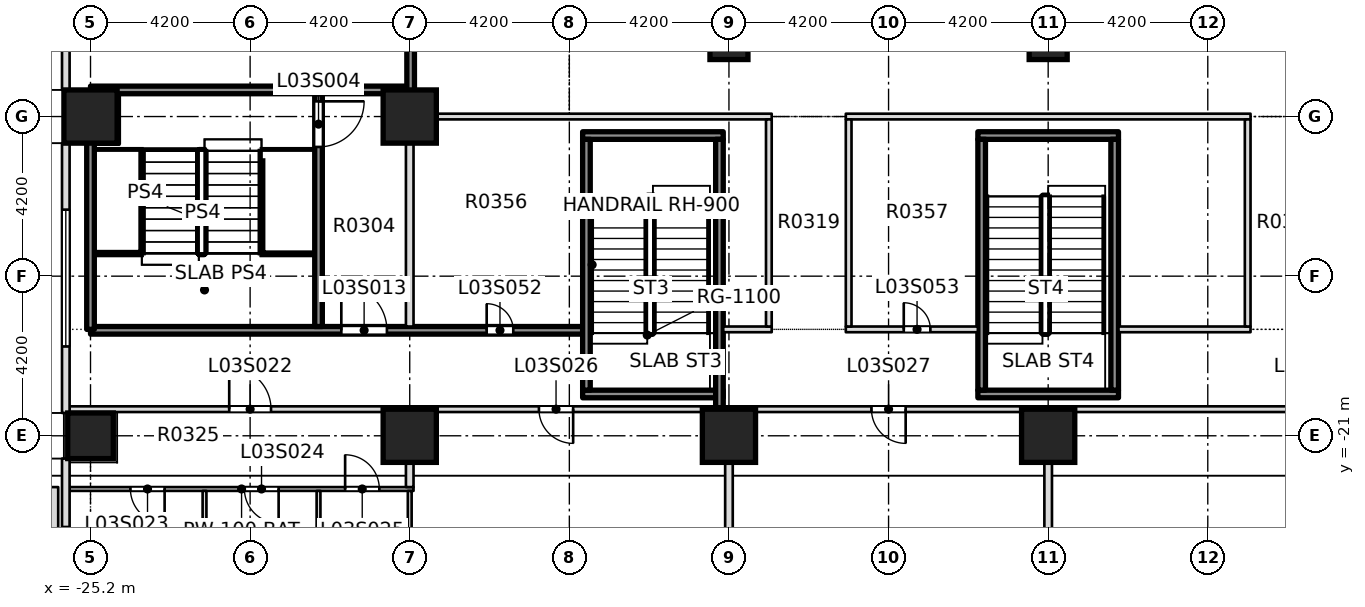
"""IFC4 building model, lengths in metres.
Left out: names, types, materials, properties, quantities, classifications, styles, units other than length and angle.
Written with IfcOpenShell. Run it as: python <this file> out.ifc"""

import sys

from ifc_helpers import new_model, si_unit, direction, frame, frame_2d, origin, origin_2d, place, context, subcontext, project, spatial, rectangle, extrude, element, fill, save


model = new_model("IFC4")
c1 = context("Model", 3, precision=1e-05, world=origin(), true_north=direction((0.0, 1.0)))
c2 = subcontext(c1, "Body", "Model", "MODEL_VIEW")
j1 = project(units=[si_unit("LENGTHUNIT", "METRE"), si_unit("PLANEANGLEUNIT", "RADIAN")], contexts=[c1])
p1 = place(None, origin())
s1 = spatial("IfcSite", under=j1, at=p1, CompositionType="ELEMENT")
p2 = place(p1, origin())
s2 = spatial("IfcBuilding", under=s1, at=p2, CompositionType="ELEMENT")
p3 = place(p2, frame((0.0, 0.0, 20.0)))
s3 = spatial("IfcBuildingStorey", under=s2, at=p3, CompositionType="ELEMENT", Elevation=20.0)
for number, where, z_axis, x_axis in (
    (1, (-16.8, -21.0, -0.4), (0.0, 0.0, 1.0), (1.0, 0.0, 0.0)),
    (2, (-8.4, -21.0, -0.4), (0.0, 0.0, 1.0), (1.0, 0.0, 0.0)),
    (3, (0.0, -21.0, -0.4), (0.0, 0.0, 1.0), (1.0, 0.0, 0.0)),
    (4, (-25.2, -12.6, -0.4), (0.0, 0.0, 1.0), (1.0, 0.0, 0.0)),
    (5, (-16.8, -12.6, -0.4), (0.0, 0.0, 1.0), (1.0, 0.0, 0.0)),
):
    element("IfcColumn", number, at=place(p3, frame(where, z_axis=z_axis, x_axis=x_axis)), inside=s3, PredefinedType="COLUMN", context=c2, shape_type="SweptSolid", body=[
        extrude(rectangle(XDim=1.4, YDim=1.4, at=origin_2d()), origin(), (0.0, 0.0, 1.0), 5.0),
    ])
for number, where, z_axis, x_axis in (
    (6, (-8.4, -10.6, -0.4), (0.0, 0.0, 1.0), (1.0, 0.0, 0.0)),
    (7, (0.0, -10.6, -0.4), (0.0, 0.0, 1.0), (1.0, 0.0, 0.0)),
):
    element("IfcColumn", number, at=place(p3, frame(where, z_axis=z_axis, x_axis=x_axis)), inside=s3, PredefinedType="COLUMN", context=c2, shape_type="SweptSolid", body=[
        extrude(rectangle(XDim=1.0, YDim=1.0, at=origin_2d()), origin(), (0.0, 0.0, 1.0), 5.0),
    ])
p4 = place(p3, frame((-25.2, -21.0, 0.0), z_axis=(0.0, 0.0, 1.0), x_axis=(1.0, 0.0, 0.0)))
e8 = element("IfcColumn", 8, at=p4, inside=s3, PredefinedType="COLUMN", context=c2, shape_type="SweptSolid", body=[
    extrude(rectangle(XDim=1.2, YDim=1.2, at=origin_2d()), origin(), (0.0, 0.0, 1.0), 5.0),
])
p5 = place(p3, frame((-26.15, -30.25, 5.0), z_axis=(0.0, 0.0, 1.0), x_axis=(0.0, 1.0, 0.0)))
e9 = element("IfcWall", 9, at=p5, inside=s3, PredefinedType="PARAPET", context=c2, shape_type="SweptSolid", body=[
    extrude(rectangle(XDim=7.9, YDim=0.2, at=frame_2d((3.95, 0.0))), origin(), (0.0, 0.0, 1.0), 1.2),
])
p6 = place(p3, frame((-25.75, -22.4, 0.0), z_axis=(0.0, 0.0, 1.0), x_axis=(1.0, 0.0, 0.0)))
e10 = element("IfcWall", 10, at=p6, inside=s3, PredefinedType="PARTITIONING", context=c2, shape_type="SweptSolid", body=[
    extrude(rectangle(XDim=9.05, YDim=0.1, at=frame_2d((4.525, 0.0))), origin(), (0.0, 0.0, 1.0), 4.6),
])
p7 = place(p6, frame((1.6, 0.0, 0.0)))
e11 = element("IfcOpeningElement", 11, at=p7, cuts=e10, PredefinedType="OPENING", context=c2, shape_type="SweptSolid", body=[
    extrude(rectangle(XDim=0.9, YDim=2.1, at=frame_2d((0.45, 1.05))), frame((0.0, 0.06, 0.0), z_axis=(0.0, -1.0, 0.0), x_axis=(1.0, 0.0, 0.0)), (0.0, 0.0, 1.0), 0.12),
])
p8 = place(p6, frame((4.6, 0.0, 0.0)))
e12 = element("IfcOpeningElement", 12, at=p8, cuts=e10, PredefinedType="OPENING", context=c2, shape_type="SweptSolid", body=[
    extrude(rectangle(XDim=0.9, YDim=2.1, at=frame_2d((0.45, 1.05))), frame((0.0, 0.06, 0.0), z_axis=(0.0, -1.0, 0.0), x_axis=(1.0, 0.0, 0.0)), (0.0, 0.0, 1.0), 0.12),
])
p9 = place(p6, frame((7.25, 0.0, 0.0)))
e13 = element("IfcOpeningElement", 13, at=p9, cuts=e10, PredefinedType="OPENING", context=c2, shape_type="SweptSolid", body=[
    extrude(rectangle(XDim=0.9, YDim=2.1, at=frame_2d((0.45, 1.05))), frame((0.0, 0.06, 0.0), z_axis=(0.0, -1.0, 0.0), x_axis=(1.0, 0.0, 0.0)), (0.0, 0.0, 1.0), 0.12),
])
p10 = place(p3, frame((-25.75, -20.3, 0.0), z_axis=(0.0, 0.0, 1.0), x_axis=(1.0, 0.0, 0.0)))
e14 = element("IfcWall", 14, at=p10, inside=s3, PredefinedType="PARTITIONING", context=c2, shape_type="SweptSolid", body=[
    extrude(rectangle(XDim=59.425, YDim=0.15, at=frame_2d((29.712, 0.0))), origin(), (0.0, 0.0, 1.0), 4.6),
])
p11 = place(p10, frame((4.2, 0.0, 0.0)))
e15 = element("IfcOpeningElement", 15, at=p11, cuts=e14, PredefinedType="OPENING", context=c2, shape_type="SweptSolid", body=[
    extrude(rectangle(XDim=1.1, YDim=2.1, at=frame_2d((0.55, 1.05))), frame((0.0, 0.085, 0.0), z_axis=(0.0, -1.0, 0.0), x_axis=(1.0, 0.0, 0.0)), (0.0, 0.0, 1.0), 0.17),
])
p12 = place(p10, frame((12.35, 0.0, 0.0)))
e16 = element("IfcOpeningElement", 16, at=p12, cuts=e14, PredefinedType="OPENING", context=c2, shape_type="SweptSolid", body=[
    extrude(rectangle(XDim=0.9, YDim=2.1, at=frame_2d((0.45, 1.05))), frame((0.0, 0.085, 0.0), z_axis=(0.0, -1.0, 0.0), x_axis=(1.0, 0.0, 0.0)), (0.0, 0.0, 1.0), 0.17),
])
p13 = place(p10, frame((21.1, 0.0, 0.0)))
e17 = element("IfcOpeningElement", 17, at=p13, cuts=e14, PredefinedType="OPENING", context=c2, shape_type="SweptSolid", body=[
    extrude(rectangle(XDim=0.9, YDim=2.1, at=frame_2d((0.45, 1.05))), frame((0.0, 0.085, 0.0), z_axis=(0.0, -1.0, 0.0), x_axis=(1.0, 0.0, 0.0)), (0.0, 0.0, 1.0), 0.17),
])
p14 = place(p10, frame((32.2, 0.0, 0.0)))
e18 = element("IfcOpeningElement", 18, at=p14, cuts=e14, PredefinedType="OPENING", context=c2, shape_type="SweptSolid", body=[
    extrude(rectangle(XDim=1.2, YDim=2.1, at=frame_2d((0.6, 1.05))), frame((0.0, 0.085, 0.0), z_axis=(0.0, -1.0, 0.0), x_axis=(1.0, 0.0, 0.0)), (0.0, 0.0, 1.0), 0.17),
])
p15 = place(p10, frame((46.2, 0.0, 0.0)))
e19 = element("IfcOpeningElement", 19, at=p15, cuts=e14, PredefinedType="OPENING", context=c2, shape_type="SweptSolid", body=[
    extrude(rectangle(XDim=1.1, YDim=2.1, at=frame_2d((0.55, 1.05))), frame((0.0, 0.085, 0.0), z_axis=(0.0, -1.0, 0.0), x_axis=(1.0, 0.0, 0.0)), (0.0, 0.0, 1.0), 0.17),
])
p16 = place(p10, frame((54.7, 0.0, 0.0)))
e20 = element("IfcOpeningElement", 20, at=p16, cuts=e14, PredefinedType="OPENING", context=c2, shape_type="SweptSolid", body=[
    extrude(rectangle(XDim=0.9, YDim=2.1, at=frame_2d((0.45, 1.05))), frame((0.0, 0.085, 0.0), z_axis=(0.0, -1.0, 0.0), x_axis=(1.0, 0.0, 0.0)), (0.0, 0.0, 1.0), 0.17),
])
p17 = place(p3, frame((-25.2, -18.225, 0.0), z_axis=(0.0, 0.0, 1.0), x_axis=(1.0, 0.0, 0.0)))
e21 = element("IfcWall", 21, at=p17, inside=s3, PredefinedType="SOLIDWALL", context=c2, shape_type="SweptSolid", body=[
    extrude(rectangle(XDim=12.95, YDim=0.2, at=frame_2d((6.475, 0.0))), origin(), (0.0, 0.0, 1.0), 4.6),
])
p18 = place(p17, frame((6.6, 0.0, 0.0)))
e22 = element("IfcOpeningElement", 22, at=p18, cuts=e21, PredefinedType="OPENING", context=c2, shape_type="SweptSolid", body=[
    extrude(rectangle(XDim=1.2, YDim=2.1, at=frame_2d((0.6, 1.05))), frame((0.0, 0.11, 0.0), z_axis=(0.0, -1.0, 0.0), x_axis=(1.0, 0.0, 0.0)), (0.0, 0.0, 1.0), 0.22),
])
p19 = place(p17, frame((10.425, 0.0, 0.0)))
e23 = element("IfcOpeningElement", 23, at=p19, cuts=e21, PredefinedType="OPENING", context=c2, shape_type="SweptSolid", body=[
    extrude(rectangle(XDim=0.7, YDim=2.1, at=frame_2d((0.35, 1.05))), frame((0.0, 0.11, 0.0), z_axis=(0.0, -1.0, 0.0), x_axis=(1.0, 0.0, 0.0)), (0.0, 0.0, 1.0), 0.22),
])
p20 = place(p3, frame((-8.55, -18.2, 0.0), z_axis=(0.0, 0.0, 1.0), x_axis=(1.0, 0.0, 0.0)))
e24 = element("IfcWall", 24, at=p20, inside=s3, PredefinedType="PARTITIONING", context=c2, shape_type="SweptSolid", body=[
    extrude(rectangle(XDim=1.275, YDim=0.15, at=frame_2d((0.638, 0.0))), origin(), (0.0, 0.0, 1.0), 4.6),
])
p21 = place(p3, frame((-5.325, -18.2, 0.0), z_axis=(0.0, 0.0, 1.0), x_axis=(1.0, 0.0, 0.0)))
e25 = element("IfcWall", 25, at=p21, inside=s3, PredefinedType="PARTITIONING", context=c2, shape_type="SweptSolid", body=[
    extrude(rectangle(XDim=3.475, YDim=0.15, at=frame_2d((1.737, 0.0))), origin(), (0.0, 0.0, 1.0), 4.6),
])
p22 = place(p21, frame((1.525, 0.0, 0.0)))
e26 = element("IfcOpeningElement", 26, at=p22, cuts=e25, PredefinedType="OPENING", context=c2, shape_type="SweptSolid", body=[
    extrude(rectangle(XDim=0.7, YDim=2.1, at=frame_2d((0.35, 1.05))), frame((0.0, 0.085, 0.0), z_axis=(0.0, -1.0, 0.0), x_axis=(1.0, 0.0, 0.0)), (0.0, 0.0, 1.0), 0.17),
])
p23 = place(p3, frame((1.85, -18.2, 0.0), z_axis=(0.0, 0.0, 1.0), x_axis=(1.0, 0.0, 0.0)))
e27 = element("IfcWall", 27, at=p23, inside=s3, PredefinedType="PARTITIONING", context=c2, shape_type="SweptSolid", body=[
    extrude(rectangle(XDim=3.475, YDim=0.15, at=frame_2d((1.737, 0.0))), origin(), (0.0, 0.0, 1.0), 4.6),
])
p24 = place(p3, frame((-16.9, -12.6, 0.0), z_axis=(0.0, 0.0, 1.0), x_axis=(1.0, 0.0, 0.0)))
e28 = element("IfcWall", 28, at=p24, inside=s3, PredefinedType="PARTITIONING", context=c2, shape_type="SweptSolid", body=[
    extrude(rectangle(XDim=9.625, YDim=0.15, at=frame_2d((4.812, 0.0))), origin(), (0.0, 0.0, 1.0), 4.6),
])
p25 = place(p3, frame((-5.325, -12.6, 0.0), z_axis=(0.0, 0.0, 1.0), x_axis=(1.0, 0.0, 0.0)))
e29 = element("IfcWall", 29, at=p25, inside=s3, PredefinedType="PARTITIONING", context=c2, shape_type="SweptSolid", body=[
    extrude(rectangle(XDim=10.65, YDim=0.15, at=frame_2d((5.325, 0.0))), origin(), (0.0, 0.0, 1.0), 4.6),
])
p26 = place(p3, frame((-25.2, -11.9, 0.0), z_axis=(0.0, 0.0, 1.0), x_axis=(1.0, 0.0, 0.0)))
e30 = element("IfcWall", 30, at=p26, inside=s3, PredefinedType="SOLIDWALL", context=c2, shape_type="SweptSolid", body=[
    extrude(rectangle(XDim=8.325, YDim=0.2, at=frame_2d((4.163, 0.0))), origin(), (0.0, 0.0, 1.0), 4.6),
])
for number, where, z_axis, x_axis in (
    (31, (-22.2, -29.95, 0.0), (0.0, 0.0, 1.0), (0.0, 1.0, 0.0)),
    (32, (-19.2, -29.95, 0.0), (0.0, 0.0, 1.0), (0.0, 1.0, 0.0)),
):
    element("IfcWall", number, at=place(p3, frame(where, z_axis=z_axis, x_axis=x_axis)), inside=s3, PredefinedType="PARTITIONING", context=c2, shape_type="SweptSolid", body=[
        extrude(rectangle(XDim=7.5, YDim=0.1, at=frame_2d((3.75, 0.0))), origin(), (0.0, 0.0, 1.0), 4.6),
    ])
p27 = place(p3, frame((-19.2, -18.125, 0.0), z_axis=(0.0, 0.0, 1.0), x_axis=(0.0, 1.0, 0.0)))
e33 = element("IfcWall", 33, at=p27, inside=s3, PredefinedType="SOLIDWALL", context=c2, shape_type="SweptSolid", body=[
    extrude(rectangle(XDim=6.125, YDim=0.2, at=frame_2d((3.062, 0.0))), origin(), (0.0, 0.0, 1.0), 4.6),
])
p28 = place(p27, frame((4.725, 0.0, 0.0)))
e34 = element("IfcOpeningElement", 34, at=p28, cuts=e33, PredefinedType="OPENING", context=c2, shape_type="SweptSolid", body=[
    extrude(rectangle(XDim=1.2, YDim=2.1, at=frame_2d((0.6, 1.05))), frame((0.0, 0.11, 0.0), z_axis=(0.0, -1.0, 0.0), x_axis=(1.0, 0.0, 0.0)), (0.0, 0.0, 1.0), 0.22),
])
p29 = place(p3, frame((-16.8, -29.95, 0.0), z_axis=(0.0, 0.0, 1.0), x_axis=(0.0, 1.0, 0.0)))
e35 = element("IfcWall", 35, at=p29, inside=s3, PredefinedType="PARTITIONING", context=c2, shape_type="SweptSolid", body=[
    extrude(rectangle(XDim=7.5, YDim=0.1, at=frame_2d((3.75, 0.0))), origin(), (0.0, 0.0, 1.0), 4.6),
])
p30 = place(p3, frame((-16.8, -22.35, 0.0), z_axis=(0.0, 0.0, 1.0), x_axis=(0.0, 1.0, 0.0)))
e36 = element("IfcWall", 36, at=p30, inside=s3, PredefinedType="PARTITIONING", context=c2, shape_type="SweptSolid", body=[
    extrude(rectangle(XDim=1.975, YDim=0.2, at=frame_2d((0.988, 0.0))), origin(), (0.0, 0.0, 1.0), 4.6),
])
p31 = place(p3, frame((-16.8, -18.125, 0.0), z_axis=(0.0, 0.0, 1.0), x_axis=(0.0, 1.0, 0.0)))
e37 = element("IfcWall", 37, at=p31, inside=s3, PredefinedType="PARTITIONING", context=c2, shape_type="SweptSolid", body=[
    extrude(rectangle(XDim=5.45, YDim=0.2, at=frame_2d((2.725, 0.0))), origin(), (0.0, 0.0, 1.0), 4.6),
])
p32 = place(p3, frame((-16.775, -12.525, 0.0), z_axis=(0.0, 0.0, 1.0), x_axis=(-0.000727609751, 0.999999735292, 0.0)))
e38 = element("IfcWall", 38, at=p32, inside=s3, PredefinedType="SOLIDWALL", context=c2, shape_type="SweptSolid", body=[
    extrude(rectangle(XDim=34.225, YDim=0.2, at=frame_2d((17.112, 0.0))), origin(), (0.0, 0.0, 1.0), 4.6),
])
p33 = place(p32, frame((16.225, 0.0, 0.0)))
e39 = element("IfcOpeningElement", 39, at=p33, cuts=e38, PredefinedType="OPENING", context=c2, shape_type="SweptSolid", body=[
    extrude(rectangle(XDim=0.9, YDim=2.1, at=frame_2d((0.45, 1.05))), frame((0.0, 0.11, 0.0), z_axis=(0.0, -1.0, 0.0), x_axis=(1.0, 0.0, 0.0)), (0.0, 0.0, 1.0), 0.22),
])
p34 = place(p3, frame((-8.4, -29.95, 0.0), z_axis=(0.0, 0.0, 1.0), x_axis=(0.0, 1.0, 0.0)))
e40 = element("IfcWall", 40, at=p34, inside=s3, PredefinedType="PARTITIONING", context=c2, shape_type="SweptSolid", body=[
    extrude(rectangle(XDim=9.575, YDim=0.2, at=frame_2d((4.788, 0.0))), origin(), (0.0, 0.0, 1.0), 4.6),
])
for number, where, z_axis, x_axis in (
    (41, (-7.35, -18.125, 0.0), (0.0, 0.0, 1.0), (0.0, 1.0, 0.0)),
    (42, (-5.25, -18.125, 0.0), (0.0, 0.0, 1.0), (0.0, 1.0, 0.0)),
):
    element("IfcWall", number, at=place(p3, frame(where, z_axis=z_axis, x_axis=x_axis)), inside=s3, PredefinedType="PARTITIONING", context=c2, shape_type="SweptSolid", body=[
        extrude(rectangle(XDim=5.45, YDim=0.15, at=frame_2d((2.725, 0.0))), origin(), (0.0, 0.0, 1.0), 4.6),
    ])
p35 = place(p3, frame((0.0, -29.95, 0.0), z_axis=(0.0, 0.0, 1.0), x_axis=(0.0, 1.0, 0.0)))
e43 = element("IfcWall", 43, at=p35, inside=s3, PredefinedType="PARTITIONING", context=c2, shape_type="SweptSolid", body=[
    extrude(rectangle(XDim=9.575, YDim=0.2, at=frame_2d((4.788, 0.0))), origin(), (0.0, 0.0, 1.0), 4.6),
])
p36 = place(p3, frame((5.25, -18.125, 0.0), z_axis=(0.0, 0.0, 1.0), x_axis=(0.0, 1.0, 0.0)))
e44 = element("IfcWall", 44, at=p36, inside=s3, PredefinedType="PARTITIONING", context=c2, shape_type="SweptSolid", body=[
    extrude(rectangle(XDim=5.45, YDim=0.15, at=frame_2d((2.725, 0.0))), origin(), (0.0, 0.0, 1.0), 4.6),
])
p37 = place(p3, frame((-25.85, -4.9, 0.0), z_axis=(0.0, 0.0, 1.0), x_axis=(0.0, -1.0, 0.0)))
e45 = element("IfcWall", 45, at=p37, inside=s3, PredefinedType="STANDARD", context=c2, shape_type="SweptSolid", body=[
    extrude(rectangle(XDim=7.0, YDim=0.2, at=frame_2d((3.5, 0.0))), origin(), (0.0, 0.0, 1.0), 4.6),
])
p38 = place(p37, frame((1.7, 0.0, 0.9)))
e46 = element("IfcOpeningElement", 46, at=p38, cuts=e45, PredefinedType="OPENING", context=c2, shape_type="SweptSolid", body=[
    extrude(rectangle(XDim=3.6, YDim=2.8, at=frame_2d((1.8, 1.4))), frame((0.0, 0.11, 0.0), z_axis=(0.0, -1.0, 0.0), x_axis=(1.0, 0.0, 0.0)), (0.0, 0.0, 1.0), 0.22),
])
p39 = place(p3, frame((-25.85, -13.3, 0.0), z_axis=(0.0, 0.0, 1.0), x_axis=(0.0, -1.0, 0.0)))
e47 = element("IfcWall", 47, at=p39, inside=s3, PredefinedType="STANDARD", context=c2, shape_type="SweptSolid", body=[
    extrude(rectangle(XDim=7.1, YDim=0.2, at=frame_2d((3.55, 0.0))), origin(), (0.0, 0.0, 1.0), 4.6),
])
p40 = place(p39, frame((1.75, 0.0, 0.9)))
e48 = element("IfcOpeningElement", 48, at=p40, cuts=e47, PredefinedType="OPENING", context=c2, shape_type="SweptSolid", body=[
    extrude(rectangle(XDim=3.6, YDim=2.8, at=frame_2d((1.8, 1.4))), frame((0.0, 0.11, 0.0), z_axis=(0.0, -1.0, 0.0), x_axis=(1.0, 0.0, 0.0)), (0.0, 0.0, 1.0), 0.22),
])
p41 = place(p3, frame((-25.85, -21.6, 0.0), z_axis=(0.0, 0.0, 1.0), x_axis=(0.0, -1.0, 0.0)))
e49 = element("IfcWall", 49, at=p41, inside=s3, PredefinedType="STANDARD", context=c2, shape_type="SweptSolid", body=[
    extrude(rectangle(XDim=7.2, YDim=0.2, at=frame_2d((3.6, 0.0))), origin(), (0.0, 0.0, 1.0), 4.6),
])
p42 = place(p41, frame((1.8, 0.0, 0.9)))
e50 = element("IfcOpeningElement", 50, at=p42, cuts=e49, PredefinedType="OPENING", context=c2, shape_type="SweptSolid", body=[
    extrude(rectangle(XDim=3.6, YDim=2.8, at=frame_2d((1.8, 1.4))), frame((0.0, 0.11, 0.0), z_axis=(0.0, -1.0, 0.0), x_axis=(1.0, 0.0, 0.0)), (0.0, 0.0, 1.0), 0.22),
])
for number, where, z_axis, x_axis in (
    (51, (-12.25, -19.9, 0.0), (0.0, 0.0, 1.0), (1.0, 0.0, 0.0)),
    (52, (-12.25, -13.1, 0.0), (0.0, 0.0, 1.0), (1.0, 0.0, 0.0)),
):
    element("IfcWall", number, at=place(p3, frame(where, z_axis=z_axis, x_axis=x_axis)), inside=s3, PredefinedType="SOLIDWALL", context=c2, shape_type="SweptSolid", body=[
        extrude(rectangle(XDim=3.7, YDim=0.2, at=frame_2d((1.85, 0.0))), origin(), (0.0, 0.0, 1.0), 4.6),
    ])
p43 = place(p3, frame((-12.15, -19.8, 0.0), z_axis=(0.0, 0.0, 1.0), x_axis=(0.0, 1.0, 0.0)))
e53 = element("IfcWall", 53, at=p43, inside=s3, PredefinedType="SOLIDWALL", context=c2, shape_type="SweptSolid", body=[
    extrude(rectangle(XDim=6.6, YDim=0.2, at=frame_2d((3.3, 0.0))), origin(), (0.0, 0.0, 1.0), 4.6),
])
p44 = place(p3, frame((-8.65, -20.3, 0.0), z_axis=(0.0, 0.0, 1.0), x_axis=(0.0, 1.0, 0.0)))
e54 = element("IfcWall", 54, at=p44, inside=s3, PredefinedType="SOLIDWALL", context=c2, shape_type="SweptSolid", body=[
    extrude(rectangle(XDim=7.1, YDim=0.2, at=frame_2d((3.55, 0.0))), origin(), (0.0, 0.0, 1.0), 4.6),
])
for number, where, z_axis, x_axis in (
    (55, (-1.85, -19.9, 0.0), (0.0, 0.0, 1.0), (1.0, 0.0, 0.0)),
    (56, (-1.85, -13.1, 0.0), (0.0, 0.0, 1.0), (1.0, 0.0, 0.0)),
):
    element("IfcWall", number, at=place(p3, frame(where, z_axis=z_axis, x_axis=x_axis)), inside=s3, PredefinedType="SOLIDWALL", context=c2, shape_type="SweptSolid", body=[
        extrude(rectangle(XDim=3.7, YDim=0.2, at=frame_2d((1.85, 0.0))), origin(), (0.0, 0.0, 1.0), 4.6),
    ])
for number, where, z_axis, x_axis in (
    (57, (-1.75, -19.8, 0.0), (0.0, 0.0, 1.0), (0.0, 1.0, 0.0)),
    (58, (1.75, -19.8, 0.0), (0.0, 0.0, 1.0), (0.0, 1.0, 0.0)),
):
    element("IfcWall", number, at=place(p3, frame(where, z_axis=z_axis, x_axis=x_axis)), inside=s3, PredefinedType="SOLIDWALL", context=c2, shape_type="SweptSolid", body=[
        extrude(rectangle(XDim=6.6, YDim=0.2, at=frame_2d((3.3, 0.0))), origin(), (0.0, 0.0, 1.0), 4.6),
    ])
p45 = place(p3, frame((-25.2, -18.2, 0.0), z_axis=(0.0, 0.0, 1.0), x_axis=(0.0, 1.0, 0.0)))
e59 = element("IfcWall", 59, at=p45, inside=s3, PredefinedType="SOLIDWALL", context=c2, shape_type="SweptSolid", body=[
    extrude(rectangle(XDim=5.3, YDim=0.2, at=frame_2d((2.65, 0.0))), origin(), (0.0, 0.0, 1.0), 4.6),
])
p46 = place(p28, origin())
e60 = element("IfcDoor", 60, at=p46, inside=s3, OperationType="DOUBLE_DOOR_SINGLE_SWING", PredefinedType="DOOR", context=c2, shape_type="SweptSolid", body=[
    extrude(rectangle(XDim=1.2, YDim=2.1, at=frame_2d((0.6, 1.05))), frame((0.0, 0.025, 0.0), z_axis=(0.0, -1.0, 0.0), x_axis=(1.0, 0.0, 0.0)), (0.0, 0.0, 1.0), 0.05),
])
fill(e34, e60)
p47 = place(p18, origin())
e61 = element("IfcDoor", 61, at=p47, inside=s3, OperationType="SINGLE_SWING_RIGHT", PredefinedType="DOOR", context=c2, shape_type="SweptSolid", body=[
    extrude(rectangle(XDim=1.2, YDim=2.1, at=frame_2d((0.6, 1.05))), frame((0.0, 0.025, 0.0), z_axis=(0.0, -1.0, 0.0), x_axis=(1.0, 0.0, 0.0)), (0.0, 0.0, 1.0), 0.05),
])
fill(e22, e61)
p48 = place(p11, origin())
e62 = element("IfcDoor", 62, at=p48, inside=s3, OperationType="SINGLE_SWING_RIGHT", PredefinedType="DOOR", context=c2, shape_type="SweptSolid", body=[
    extrude(rectangle(XDim=1.1, YDim=2.1, at=frame_2d((0.55, 1.05))), frame((0.0, 0.025, 0.0), z_axis=(0.0, -1.0, 0.0), x_axis=(1.0, 0.0, 0.0)), (0.0, 0.0, 1.0), 0.05),
])
fill(e15, e62)
p49 = place(p7, origin())
e63 = element("IfcDoor", 63, at=p49, inside=s3, OperationType="SINGLE_SWING_RIGHT", PredefinedType="DOOR", context=c2, shape_type="SweptSolid", body=[
    extrude(rectangle(XDim=0.9, YDim=2.1, at=frame_2d((0.45, 1.05))), frame((0.0, 0.025, 0.0), z_axis=(0.0, -1.0, 0.0), x_axis=(1.0, 0.0, 0.0)), (0.0, 0.0, 1.0), 0.05),
])
fill(e11, e63)
p50 = place(p8, origin())
e64 = element("IfcDoor", 64, at=p50, inside=s3, OperationType="SINGLE_SWING_RIGHT", PredefinedType="DOOR", context=c2, shape_type="SweptSolid", body=[
    extrude(rectangle(XDim=0.9, YDim=2.1, at=frame_2d((0.45, 1.05))), frame((0.0, 0.025, 0.0), z_axis=(0.0, -1.0, 0.0), x_axis=(1.0, 0.0, 0.0)), (0.0, 0.0, 1.0), 0.05),
])
fill(e12, e64)
p51 = place(p9, origin())
e65 = element("IfcDoor", 65, at=p51, inside=s3, OperationType="SINGLE_SWING_RIGHT", PredefinedType="DOOR", context=c2, shape_type="SweptSolid", body=[
    extrude(rectangle(XDim=0.9, YDim=2.1, at=frame_2d((0.45, 1.05))), frame((0.0, 0.025, 0.0), z_axis=(0.0, -1.0, 0.0), x_axis=(1.0, 0.0, 0.0)), (0.0, 0.0, 1.0), 0.05),
])
fill(e13, e65)
p52 = place(p12, origin())
e66 = element("IfcDoor", 66, at=p52, inside=s3, OperationType="SINGLE_SWING_LEFT", PredefinedType="DOOR", context=c2, shape_type="SweptSolid", body=[
    extrude(rectangle(XDim=0.9, YDim=2.1, at=frame_2d((0.45, 1.05))), frame((0.0, 0.025, 0.0), z_axis=(0.0, -1.0, 0.0), x_axis=(1.0, 0.0, 0.0)), (0.0, 0.0, 1.0), 0.05),
])
fill(e16, e66)
p53 = place(p13, origin())
e67 = element("IfcDoor", 67, at=p53, inside=s3, OperationType="SINGLE_SWING_LEFT", PredefinedType="DOOR", context=c2, shape_type="SweptSolid", body=[
    extrude(rectangle(XDim=0.9, YDim=2.1, at=frame_2d((0.45, 1.05))), frame((0.0, 0.025, 0.0), z_axis=(0.0, -1.0, 0.0), x_axis=(1.0, 0.0, 0.0)), (0.0, 0.0, 1.0), 0.05),
])
fill(e17, e67)
p54 = place(p19, origin())
e68 = element("IfcDoor", 68, at=p54, inside=s3, OperationType="SINGLE_SWING_RIGHT", PredefinedType="DOOR", context=c2, shape_type="SweptSolid", body=[
    extrude(rectangle(XDim=0.7, YDim=2.1, at=frame_2d((0.35, 1.05))), frame((0.0, 0.025, 0.0), z_axis=(0.0, -1.0, 0.0), x_axis=(1.0, 0.0, 0.0)), (0.0, 0.0, 1.0), 0.05),
])
fill(e23, e68)
p55 = place(p22, origin())
e69 = element("IfcDoor", 69, at=p55, inside=s3, OperationType="SINGLE_SWING_LEFT", PredefinedType="DOOR", context=c2, shape_type="SweptSolid", body=[
    extrude(rectangle(XDim=0.7, YDim=2.1, at=frame_2d((0.35, 1.05))), frame((0.0, 0.025, 0.0), z_axis=(0.0, -1.0, 0.0), x_axis=(1.0, 0.0, 0.0)), (0.0, 0.0, 1.0), 0.05),
])
fill(e26, e69)
p56 = place(p40, origin())
e70 = element("IfcWindow", 70, at=p56, inside=s3, PartitioningType="SINGLE_PANEL", PredefinedType="WINDOW", context=c2, shape_type="SweptSolid", body=[
    extrude(rectangle(XDim=3.6, YDim=2.8, at=frame_2d((1.8, 1.4))), frame((0.0, 0.03, 0.0), z_axis=(0.0, -1.0, 0.0), x_axis=(1.0, 0.0, 0.0)), (0.0, 0.0, 1.0), 0.06),
])
fill(e48, e70)
save(model, sys.argv[1])
